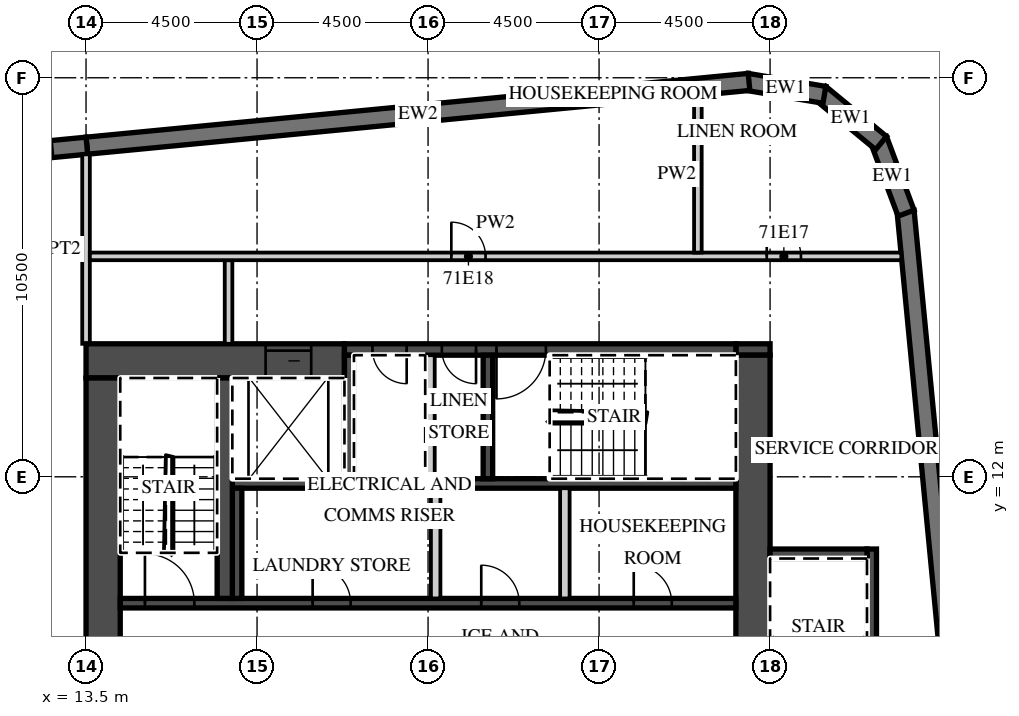
"""IFC4 building model, lengths in metres.
Left out: names, types, materials, properties, quantities, classifications, styles, units other than length and angle.
Written with IfcOpenShell. Run it as: python <this file> out.ifc"""

import sys

from ifc_helpers import new_model, si_unit, direction, frame, frame_2d, origin, place, context, subcontext, project, spatial, polyline, rectangle, outline, extrude, element, fill, save


model = new_model("IFC4")
c1 = context("Model", 3, precision=1e-05, world=origin(), true_north=direction((0.0, 1.0)))
c2 = subcontext(c1, "Body", "Model", "MODEL_VIEW")
j1 = project(units=[si_unit("LENGTHUNIT", "METRE"), si_unit("PLANEANGLEUNIT", "RADIAN")], contexts=[c1])
p1 = place(None, origin())
s1 = spatial("IfcSite", under=j1, at=p1, CompositionType="ELEMENT")
p2 = place(p1, origin())
s2 = spatial("IfcBuilding", under=s1, at=p2, CompositionType="ELEMENT")
p3 = place(p2, frame((0.0, 0.0, 285.0)))
s3 = spatial("IfcBuildingStorey", under=s2, at=p3, CompositionType="ELEMENT", Elevation=285.0)
p4 = place(p3, frame((38.132, -12.858, 0.0), z_axis=(0.0, 0.0, 1.0), x_axis=(-0.095847749461, 0.995396006082, 0.0)))
e1 = element("IfcWall", 1, at=p4, inside=s3, PredefinedType="SOLIDWALL", context=c2, shape_type="SweptSolid", body=[
    extrude(rectangle(XDim=32.0, YDim=0.45, at=frame_2d((16.0, 0.0))), origin(), (0.0, 0.0, 1.0), 3.02),
])
p5 = place(p3, frame((35.078, 18.938, 0.0), z_axis=(0.0, 0.0, 1.0), x_axis=(-0.350192909346, 0.936677599948, 0.0)))
e2 = element("IfcWall", 2, at=p5, inside=s3, PredefinedType="SOLIDWALL", context=c2, shape_type="SweptSolid", body=[
    extrude(outline(polyline([(0.0, -0.225), (2.071, -0.225), (1.95, 0.225), (0.121, 0.225), (0.0, -0.225)])), origin(), (0.0, 0.0, 1.0), 3.02),
])
p6 = place(p3, frame((34.421, 20.782, 0.0), z_axis=(0.0, 0.0, 1.0), x_axis=(-0.771593176315, 0.636116318187, 0.0)))
e3 = element("IfcWall", 3, at=p6, inside=s3, PredefinedType="SOLIDWALL", context=c2, shape_type="SweptSolid", body=[
    extrude(outline(polyline([(0.0, -0.225), (2.071, -0.225), (1.95, 0.225), (0.12, 0.225), (0.0, -0.225)])), origin(), (0.0, 0.0, 1.0), 3.02),
])
p7 = place(p3, frame((32.929, 22.051, 0.0), z_axis=(0.0, 0.0, 1.0), x_axis=(-0.986298144721, 0.164972633245, 0.0)))
e4 = element("IfcWall", 4, at=p7, inside=s3, PredefinedType="SOLIDWALL", context=c2, shape_type="SweptSolid", body=[
    extrude(outline(polyline([(0.0, -0.225), (2.07, -0.225), (1.95, 0.225), (0.121, 0.225), (0.0, -0.225)])), origin(), (0.0, 0.0, 1.0), 3.02),
])
p8 = place(p3, frame((30.946, 22.391, 0.0), z_axis=(0.0, 0.0, 1.0), x_axis=(-0.995396397117, -0.095843688398, 0.0)))
e5 = element("IfcWall", 5, at=p8, inside=s3, PredefinedType="SOLIDWALL", context=c2, shape_type="SweptSolid", body=[
    extrude(rectangle(XDim=17.505, YDim=0.45, at=frame_2d((8.752, 0.0))), origin(), (0.0, 0.0, 1.0), 3.02),
])
p9 = place(p3, frame((13.521, 20.713, 0.0), z_axis=(0.0, 0.0, 1.0), x_axis=(-0.995396277313, -0.095844932638, 0.0)))
e6 = element("IfcWall", 6, at=p9, inside=s3, PredefinedType="SOLIDWALL", context=c2, shape_type="SweptSolid", body=[
    extrude(rectangle(XDim=51.495, YDim=0.45, at=frame_2d((25.748, 0.0))), origin(), (0.0, 0.0, 1.0), 3.02),
])
p10 = place(p9, frame((0.91, 0.0, 0.45)))
e7 = element("IfcOpeningElement", 7, at=p10, cuts=e6, PredefinedType="OPENING", context=c2, shape_type="SweptSolid", body=[
    extrude(rectangle(XDim=2.7, YDim=2.25, at=frame_2d((1.35, 1.125))), frame((0.0, 0.235, 0.0), z_axis=(0.0, -1.0, 0.0), x_axis=(1.0, 0.0, 0.0)), (0.0, 0.0, 1.0), 0.47),
])
p11 = place(p9, frame((5.431, 0.0, 0.45)))
e8 = element("IfcOpeningElement", 8, at=p11, cuts=e6, PredefinedType="OPENING", context=c2, shape_type="SweptSolid", body=[
    extrude(rectangle(XDim=2.7, YDim=2.25, at=frame_2d((1.35, 1.125))), frame((0.0, 0.235, 0.0), z_axis=(0.0, -1.0, 0.0), x_axis=(1.0, 0.0, 0.0)), (0.0, 0.0, 1.0), 0.47),
])
p12 = place(p9, frame((9.952, 0.0, 0.45)))
e9 = element("IfcOpeningElement", 9, at=p12, cuts=e6, PredefinedType="OPENING", context=c2, shape_type="SweptSolid", body=[
    extrude(rectangle(XDim=2.7, YDim=2.25, at=frame_2d((1.35, 1.125))), frame((0.0, 0.235, 0.0), z_axis=(0.0, -1.0, 0.0), x_axis=(1.0, 0.0, 0.0)), (0.0, 0.0, 1.0), 0.47),
])
p13 = place(p9, frame((14.473, 0.0, 0.45)))
e10 = element("IfcOpeningElement", 10, at=p13, cuts=e6, PredefinedType="OPENING", context=c2, shape_type="SweptSolid", body=[
    extrude(rectangle(XDim=2.7, YDim=2.25, at=frame_2d((1.35, 1.125))), frame((0.0, 0.235, 0.0), z_axis=(0.0, -1.0, 0.0), x_axis=(1.0, 0.0, 0.0)), (0.0, 0.0, 1.0), 0.47),
])
p14 = place(p9, frame((18.994, 0.0, 0.45)))
e11 = element("IfcOpeningElement", 11, at=p14, cuts=e6, PredefinedType="OPENING", context=c2, shape_type="SweptSolid", body=[
    extrude(rectangle(XDim=2.7, YDim=2.25, at=frame_2d((1.35, 1.125))), frame((0.0, 0.235, 0.0), z_axis=(0.0, -1.0, 0.0), x_axis=(1.0, 0.0, 0.0)), (0.0, 0.0, 1.0), 0.47),
])
p15 = place(p9, frame((23.514, 0.0, 0.45)))
e12 = element("IfcOpeningElement", 12, at=p15, cuts=e6, PredefinedType="OPENING", context=c2, shape_type="SweptSolid", body=[
    extrude(rectangle(XDim=2.7, YDim=2.25, at=frame_2d((1.35, 1.125))), frame((0.0, 0.235, 0.0), z_axis=(0.0, -1.0, 0.0), x_axis=(1.0, 0.0, 0.0)), (0.0, 0.0, 1.0), 0.47),
])
p16 = place(p9, frame((28.035, 0.0, 0.45)))
e13 = element("IfcOpeningElement", 13, at=p16, cuts=e6, PredefinedType="OPENING", context=c2, shape_type="SweptSolid", body=[
    extrude(rectangle(XDim=2.7, YDim=2.25, at=frame_2d((1.35, 1.125))), frame((0.0, 0.235, 0.0), z_axis=(0.0, -1.0, 0.0), x_axis=(1.0, 0.0, 0.0)), (0.0, 0.0, 1.0), 0.47),
])
p17 = place(p9, frame((32.556, 0.0, 0.45)))
e14 = element("IfcOpeningElement", 14, at=p17, cuts=e6, PredefinedType="OPENING", context=c2, shape_type="SweptSolid", body=[
    extrude(rectangle(XDim=2.7, YDim=2.25, at=frame_2d((1.35, 1.125))), frame((0.0, 0.235, 0.0), z_axis=(0.0, -1.0, 0.0), x_axis=(1.0, 0.0, 0.0)), (0.0, 0.0, 1.0), 0.47),
])
p18 = place(p9, frame((37.077, 0.0, 0.45)))
e15 = element("IfcOpeningElement", 15, at=p18, cuts=e6, PredefinedType="OPENING", context=c2, shape_type="SweptSolid", body=[
    extrude(rectangle(XDim=2.7, YDim=2.25, at=frame_2d((1.35, 1.125))), frame((0.0, 0.235, 0.0), z_axis=(0.0, -1.0, 0.0), x_axis=(1.0, 0.0, 0.0)), (0.0, 0.0, 1.0), 0.47),
])
p19 = place(p9, frame((41.598, 0.0, 0.45)))
e16 = element("IfcOpeningElement", 16, at=p19, cuts=e6, PredefinedType="OPENING", context=c2, shape_type="SweptSolid", body=[
    extrude(rectangle(XDim=2.7, YDim=2.25, at=frame_2d((1.35, 1.125))), frame((0.0, 0.235, 0.0), z_axis=(0.0, -1.0, 0.0), x_axis=(1.0, 0.0, 0.0)), (0.0, 0.0, 1.0), 0.47),
])
p20 = place(p9, frame((46.118, 0.0, 0.45)))
e17 = element("IfcOpeningElement", 17, at=p20, cuts=e6, PredefinedType="OPENING", context=c2, shape_type="SweptSolid", body=[
    extrude(rectangle(XDim=2.7, YDim=2.25, at=frame_2d((1.35, 1.125))), frame((0.0, 0.235, 0.0), z_axis=(0.0, -1.0, 0.0), x_axis=(1.0, 0.0, 0.0)), (0.0, 0.0, 1.0), 0.47),
])
p21 = place(p3, frame((13.5, 15.5, 0.0), z_axis=(0.0, 0.0, 1.0), x_axis=(0.0, 1.0, 0.0)))
e18 = element("IfcWall", 18, at=p21, inside=s3, PredefinedType="PARTITIONING", context=c2, shape_type="SweptSolid", body=[
    extrude(rectangle(XDim=4.985, YDim=0.2, at=frame_2d((2.493, 0.0))), origin(), (0.0, 0.0, 1.0), 3.02),
])
p22 = place(p3, frame((13.5, 15.05, 0.0), z_axis=(0.0, 0.0, 1.0), x_axis=(1.0, 0.0, 0.0)))
e19 = element("IfcWall", 19, at=p22, inside=s3, PredefinedType="SHEAR", context=c2, shape_type="SweptSolid", body=[
    extrude(rectangle(XDim=6.8, YDim=0.9, at=frame_2d((3.4, 0.0))), origin(), (0.0, 0.0, 1.0), 3.02),
])
p23 = place(p22, frame((4.725, 0.0, 0.0)))
e20 = element("IfcOpeningElement", 20, at=p23, cuts=e19, PredefinedType="OPENING", context=c2, shape_type="SweptSolid", body=[
    extrude(rectangle(XDim=1.2, YDim=2.1, at=frame_2d((0.6, 1.05))), frame((0.0, 0.46, 0.0), z_axis=(0.0, -1.0, 0.0), x_axis=(1.0, 0.0, 0.0)), (0.0, 0.0, 1.0), 0.92),
])
p24 = place(p3, frame((30.6, 15.35, 0.0), z_axis=(0.0, 0.0, 1.0), x_axis=(1.0, 0.0, 0.0)))
e21 = element("IfcWall", 21, at=p24, inside=s3, PredefinedType="SHEAR", context=c2, shape_type="SweptSolid", body=[
    extrude(rectangle(XDim=0.9, YDim=0.3, at=frame_2d((0.45, 0.0))), origin(), (0.0, 0.0, 1.0), 3.02),
])
p25 = place(p3, frame((20.3, 15.35, 0.0), z_axis=(0.0, 0.0, 1.0), x_axis=(1.0, 0.0, 0.0)))
e22 = element("IfcWall", 22, at=p25, inside=s3, PredefinedType="SHEAR", context=c2, shape_type="SweptSolid", body=[
    extrude(rectangle(XDim=10.3, YDim=0.3, at=frame_2d((5.15, 0.0))), origin(), (0.0, 0.0, 1.0), 3.02),
])
p26 = place(p25, frame((4.0, 0.0, 0.0)))
e23 = element("IfcOpeningElement", 23, at=p26, cuts=e22, PredefinedType="OPENING", context=c2, shape_type="SweptSolid", body=[
    extrude(rectangle(XDim=1.3, YDim=2.1, at=frame_2d((0.65, 1.05))), frame((0.0, 0.16, 0.0), z_axis=(0.0, -1.0, 0.0), x_axis=(1.0, 0.0, 0.0)), (0.0, 0.0, 1.0), 0.32),
])
p27 = place(p25, frame((2.562, 0.0, 0.0)))
e24 = element("IfcOpeningElement", 24, at=p27, cuts=e22, PredefinedType="OPENING", context=c2, shape_type="SweptSolid", body=[
    extrude(rectangle(XDim=0.9, YDim=2.1, at=frame_2d((0.45, 1.05))), frame((0.0, 0.16, 0.0), z_axis=(0.0, -1.0, 0.0), x_axis=(1.0, 0.0, 0.0)), (0.0, 0.0, 1.0), 0.32),
])
p28 = place(p25, frame((0.738, 0.0, 0.0)))
e25 = element("IfcOpeningElement", 25, at=p28, cuts=e22, PredefinedType="OPENING", context=c2, shape_type="SweptSolid", body=[
    extrude(rectangle(XDim=0.9, YDim=2.1, at=frame_2d((0.45, 1.05))), frame((0.0, 0.16, 0.0), z_axis=(0.0, -1.0, 0.0), x_axis=(1.0, 0.0, 0.0)), (0.0, 0.0, 1.0), 0.32),
])
p29 = place(p3, frame((31.05, 2.4, 0.0), z_axis=(0.0, 0.0, 1.0), x_axis=(0.0, 1.0, 0.0)))
e26 = element("IfcWall", 26, at=p29, inside=s3, PredefinedType="SHEAR", context=c2, shape_type="SweptSolid", body=[
    extrude(rectangle(XDim=12.8, YDim=0.9, at=frame_2d((6.4, 0.0))), origin(), (0.0, 0.0, 1.0), 3.02),
])
p30 = place(p29, frame((0.2, 0.0, 0.0)))
e27 = element("IfcOpeningElement", 27, at=p30, cuts=e26, PredefinedType="OPENING", context=c2, shape_type="SweptSolid", body=[
    extrude(rectangle(XDim=1.1, YDim=2.1, at=frame_2d((0.55, 1.05))), frame((0.0, 0.46, 0.0), z_axis=(0.0, -1.0, 0.0), x_axis=(1.0, 0.0, 0.0)), (0.0, 0.0, 1.0), 0.92),
])
p31 = place(p3, frame((13.95, 2.4, 0.0), z_axis=(0.0, 0.0, 1.0), x_axis=(0.0, 1.0, 0.0)))
e28 = element("IfcWall", 28, at=p31, inside=s3, PredefinedType="SHEAR", context=c2, shape_type="SweptSolid", body=[
    extrude(rectangle(XDim=12.2, YDim=0.9, at=frame_2d((6.1, 0.0))), origin(), (0.0, 0.0, 1.0), 3.02),
])
p32 = place(p3, frame((14.4, 8.675, 0.0), z_axis=(0.0, 0.0, 1.0), x_axis=(1.0, 0.0, 0.0)))
e29 = element("IfcWall", 29, at=p32, inside=s3, PredefinedType="SHEAR", context=c2, shape_type="SweptSolid", body=[
    extrude(rectangle(XDim=16.2, YDim=0.25, at=frame_2d((8.1, 0.0))), origin(), (0.0, 0.0, 1.0), 3.02),
])
p33 = place(p32, frame((0.65, 0.0, 0.0)))
e30 = element("IfcOpeningElement", 30, at=p33, cuts=e29, PredefinedType="OPENING", context=c2, shape_type="SweptSolid", body=[
    extrude(rectangle(XDim=1.3, YDim=2.1, at=frame_2d((0.65, 1.05))), frame((0.0, 0.135, 0.0), z_axis=(0.0, -1.0, 0.0), x_axis=(1.0, 0.0, 0.0)), (0.0, 0.0, 1.0), 0.27),
])
p34 = place(p32, frame((13.512, 0.0, 0.0)))
e31 = element("IfcOpeningElement", 31, at=p34, cuts=e29, PredefinedType="OPENING", context=c2, shape_type="SweptSolid", body=[
    extrude(rectangle(XDim=1.0, YDim=2.1, at=frame_2d((0.5, 1.05))), frame((0.0, 0.135, 0.0), z_axis=(0.0, -1.0, 0.0), x_axis=(1.0, 0.0, 0.0)), (0.0, 0.0, 1.0), 0.27),
])
p35 = place(p32, frame((9.5, 0.0, 0.0)))
e32 = element("IfcOpeningElement", 32, at=p35, cuts=e29, PredefinedType="OPENING", context=c2, shape_type="SweptSolid", body=[
    extrude(rectangle(XDim=1.0, YDim=2.1, at=frame_2d((0.5, 1.05))), frame((0.0, 0.135, 0.0), z_axis=(0.0, -1.0, 0.0), x_axis=(1.0, 0.0, 0.0)), (0.0, 0.0, 1.0), 0.27),
])
p36 = place(p32, frame((5.062, 0.0, 0.0)))
e33 = element("IfcOpeningElement", 33, at=p36, cuts=e29, PredefinedType="OPENING", context=c2, shape_type="SweptSolid", body=[
    extrude(rectangle(XDim=1.0, YDim=2.1, at=frame_2d((0.5, 1.05))), frame((0.0, 0.135, 0.0), z_axis=(0.0, -1.0, 0.0), x_axis=(1.0, 0.0, 0.0)), (0.0, 0.0, 1.0), 0.27),
])
p37 = place(p3, frame((17.35, 11.825, 0.0), z_axis=(0.0, 0.0, 1.0), x_axis=(1.0, 0.0, 0.0)))
e34 = element("IfcWall", 34, at=p37, inside=s3, PredefinedType="SHEAR", context=c2, shape_type="SweptSolid", body=[
    extrude(rectangle(XDim=13.25, YDim=0.25, at=frame_2d((6.625, 0.0))), origin(), (0.0, 0.0, 1.0), 3.02),
])
p38 = place(p3, frame((17.475, 8.8, 0.0), z_axis=(0.0, 0.0, 1.0), x_axis=(0.0, 1.0, 0.0)))
e35 = element("IfcWall", 35, at=p38, inside=s3, PredefinedType="SHEAR", context=c2, shape_type="SweptSolid", body=[
    extrude(rectangle(XDim=2.9, YDim=0.25, at=frame_2d((1.45, 0.0))), origin(), (0.0, 0.0, 1.0), 3.02),
])
for number, where, z_axis, x_axis in (
    (36, (26.1, 8.8, 0.0), (0.0, 0.0, 1.0), (0.0, 1.0, 0.0)),
    (37, (22.7, 8.8, 0.0), (0.0, 0.0, 1.0), (0.0, 1.0, 0.0)),
):
    element("IfcWall", number, at=place(p3, frame(where, z_axis=z_axis, x_axis=x_axis)), inside=s3, PredefinedType="PARTITIONING", context=c2, shape_type="SweptSolid", body=[
        extrude(rectangle(XDim=2.9, YDim=0.25, at=frame_2d((1.45, 0.0))), origin(), (0.0, 0.0, 1.0), 3.02),
    ])
p39 = place(p3, frame((17.15, 8.8, 0.0), z_axis=(0.0, 0.0, 1.0), x_axis=(0.0, 1.0, 0.0)))
e38 = element("IfcWall", 38, at=p39, inside=s3, PredefinedType="SHEAR", context=c2, shape_type="SweptSolid", body=[
    extrude(rectangle(XDim=5.8, YDim=0.4, at=frame_2d((2.9, 0.0))), origin(), (0.0, 0.0, 1.0), 3.02),
])
for number, where, z_axis, x_axis in (
    (39, (20.425, 11.95, 0.0), (0.0, 0.0, 1.0), (0.0, 1.0, 0.0)),
    (40, (24.075, 11.95, 0.0), (0.0, 0.0, 1.0), (0.0, 1.0, 0.0)),
):
    element("IfcWall", number, at=place(p3, frame(where, z_axis=z_axis, x_axis=x_axis)), inside=s3, PredefinedType="SHEAR", context=c2, shape_type="SweptSolid", body=[
        extrude(rectangle(XDim=3.25, YDim=0.25, at=frame_2d((1.625, 0.0))), origin(), (0.0, 0.0, 1.0), 3.02),
    ])
p40 = place(p3, frame((22.55, 11.95, 0.0), z_axis=(0.0, 0.0, 1.0), x_axis=(0.0, 1.0, 0.0)))
e41 = element("IfcWall", 41, at=p40, inside=s3, PredefinedType="PARTITIONING", context=c2, shape_type="SweptSolid", body=[
    extrude(rectangle(XDim=3.25, YDim=0.25, at=frame_2d((1.625, 0.0))), origin(), (0.0, 0.0, 1.0), 3.02),
])
p41 = place(p3, frame((34.175, 1.75, 0.0), z_axis=(0.0, 0.0, 1.0), x_axis=(0.0, 1.0, 0.0)))
e42 = element("IfcWall", 42, at=p41, inside=s3, PredefinedType="SHEAR", context=c2, shape_type="SweptSolid", body=[
    extrude(rectangle(XDim=8.35, YDim=0.25, at=frame_2d((4.175, 0.0))), origin(), (0.0, 0.0, 1.0), 3.02),
])
p42 = place(p3, frame((31.5, 9.975, 0.0), z_axis=(0.0, 0.0, 1.0), x_axis=(1.0, 0.0, 0.0)))
e43 = element("IfcWall", 43, at=p42, inside=s3, PredefinedType="SHEAR", context=c2, shape_type="SweptSolid", body=[
    extrude(rectangle(XDim=2.55, YDim=0.25, at=frame_2d((1.275, 0.0))), origin(), (0.0, 0.0, 1.0), 3.02),
])
p43 = place(p3, frame((17.25, 15.5, 0.0), z_axis=(0.0, 0.0, 1.0), x_axis=(0.0, 1.0, 0.0)))
e44 = element("IfcWall", 44, at=p43, inside=s3, PredefinedType="PARTITIONING", context=c2, shape_type="SweptSolid", body=[
    extrude(rectangle(XDim=2.2, YDim=0.2, at=frame_2d((1.1, 0.0))), origin(), (0.0, 0.0, 1.0), 3.02),
])
p44 = place(p3, frame((13.6, 17.8, 0.0), z_axis=(0.0, 0.0, 1.0), x_axis=(1.0, 0.0, 0.0)))
e45 = element("IfcWall", 45, at=p44, inside=s3, PredefinedType="PARTITIONING", context=c2, shape_type="SweptSolid", body=[
    extrude(rectangle(XDim=21.354, YDim=0.2, at=frame_2d((10.677, 0.0))), origin(), (0.0, 0.0, 1.0), 3.02),
])
p45 = place(p44, frame((17.812, 0.0, 0.0)))
e46 = element("IfcOpeningElement", 46, at=p45, cuts=e45, PredefinedType="OPENING", context=c2, shape_type="SweptSolid", body=[
    extrude(rectangle(XDim=0.9, YDim=2.1, at=frame_2d((0.45, 1.05))), frame((0.0, 0.11, 0.0), z_axis=(0.0, -1.0, 0.0), x_axis=(1.0, 0.0, 0.0)), (0.0, 0.0, 1.0), 0.22),
])
p46 = place(p44, frame((9.512, 0.0, 0.0)))
e47 = element("IfcOpeningElement", 47, at=p46, cuts=e45, PredefinedType="OPENING", context=c2, shape_type="SweptSolid", body=[
    extrude(rectangle(XDim=0.9, YDim=2.1, at=frame_2d((0.45, 1.05))), frame((0.0, 0.11, 0.0), z_axis=(0.0, -1.0, 0.0), x_axis=(1.0, 0.0, 0.0)), (0.0, 0.0, 1.0), 0.22),
])
p47 = place(p3, frame((29.6, 17.9, 0.0), z_axis=(0.0, 0.0, 1.0), x_axis=(0.0, 1.0, 0.0)))
e48 = element("IfcWall", 48, at=p47, inside=s3, PredefinedType="PARTITIONING", context=c2, shape_type="SweptSolid", body=[
    extrude(rectangle(XDim=4.136, YDim=0.2, at=frame_2d((2.068, 0.0))), origin(), (0.0, 0.0, 1.0), 3.02),
])
p48 = place(p10, origin())
e49 = element("IfcWindow", 49, at=p48, inside=s3, PartitioningType="SINGLE_PANEL", PredefinedType="WINDOW", context=c2, shape_type="SweptSolid", body=[
    extrude(rectangle(XDim=2.7, YDim=2.25, at=frame_2d((1.35, 1.125))), frame((0.0, 0.09, 0.0), z_axis=(0.0, -1.0, 0.0), x_axis=(1.0, 0.0, 0.0)), (0.0, 0.0, 1.0), 0.06),
])
fill(e7, e49)
p49 = place(p23, origin())
e50 = element("IfcDoor", 50, at=p49, inside=s3, OperationType="SLIDING_TO_LEFT", PredefinedType="DOOR", context=c2, shape_type="SweptSolid", body=[
    extrude(rectangle(XDim=1.2, YDim=2.1, at=frame_2d((0.6, 1.05))), frame((0.0, 0.025, 0.0), z_axis=(0.0, -1.0, 0.0), x_axis=(1.0, 0.0, 0.0)), (0.0, 0.0, 1.0), 0.05),
])
fill(e20, e50)
p50 = place(p33, origin())
e51 = element("IfcDoor", 51, at=p50, inside=s3, OperationType="SINGLE_SWING_LEFT", PredefinedType="DOOR", context=c2, shape_type="SweptSolid", body=[
    extrude(rectangle(XDim=1.3, YDim=2.1, at=frame_2d((0.65, 1.05))), frame((0.0, 0.025, 0.0), z_axis=(0.0, -1.0, 0.0), x_axis=(1.0, 0.0, 0.0)), (0.0, 0.0, 1.0), 0.05),
])
fill(e30, e51)
p51 = place(p26, origin())
e52 = element("IfcDoor", 52, at=p51, inside=s3, OperationType="SINGLE_SWING_LEFT", PredefinedType="DOOR", context=c2, shape_type="SweptSolid", body=[
    extrude(rectangle(XDim=1.3, YDim=2.1, at=frame_2d((0.65, 1.05))), frame((0.0, 0.025, 0.0), z_axis=(0.0, -1.0, 0.0), x_axis=(1.0, 0.0, 0.0)), (0.0, 0.0, 1.0), 0.05),
])
fill(e23, e52)
p52 = place(p27, origin())
e53 = element("IfcDoor", 53, at=p52, inside=s3, OperationType="SINGLE_SWING_RIGHT", PredefinedType="DOOR", context=c2, shape_type="SweptSolid", body=[
    extrude(rectangle(XDim=0.9, YDim=2.1, at=frame_2d((0.45, 1.05))), frame((0.0, 0.025, 0.0), z_axis=(0.0, -1.0, 0.0), x_axis=(1.0, 0.0, 0.0)), (0.0, 0.0, 1.0), 0.05),
])
fill(e24, e53)
p53 = place(p28, origin())
e54 = element("IfcDoor", 54, at=p53, inside=s3, OperationType="SINGLE_SWING_RIGHT", PredefinedType="DOOR", context=c2, shape_type="SweptSolid", body=[
    extrude(rectangle(XDim=0.9, YDim=2.1, at=frame_2d((0.45, 1.05))), frame((0.0, 0.025, 0.0), z_axis=(0.0, -1.0, 0.0), x_axis=(1.0, 0.0, 0.0)), (0.0, 0.0, 1.0), 0.05),
])
fill(e25, e54)
p54 = place(p34, origin())
e55 = element("IfcDoor", 55, at=p54, inside=s3, OperationType="SINGLE_SWING_LEFT", PredefinedType="DOOR", context=c2, shape_type="SweptSolid", body=[
    extrude(rectangle(XDim=1.0, YDim=2.1, at=frame_2d((0.5, 1.05))), frame((0.0, 0.025, 0.0), z_axis=(0.0, -1.0, 0.0), x_axis=(1.0, 0.0, 0.0)), (0.0, 0.0, 1.0), 0.05),
])
fill(e31, e55)
p55 = place(p35, origin())
e56 = element("IfcDoor", 56, at=p55, inside=s3, OperationType="SINGLE_SWING_LEFT", PredefinedType="DOOR", context=c2, shape_type="SweptSolid", body=[
    extrude(rectangle(XDim=1.0, YDim=2.1, at=frame_2d((0.5, 1.05))), frame((0.0, 0.025, 0.0), z_axis=(0.0, -1.0, 0.0), x_axis=(1.0, 0.0, 0.0)), (0.0, 0.0, 1.0), 0.05),
])
fill(e32, e56)
p56 = place(p36, origin())
e57 = element("IfcDoor", 57, at=p56, inside=s3, OperationType="SINGLE_SWING_LEFT", PredefinedType="DOOR", context=c2, shape_type="SweptSolid", body=[
    extrude(rectangle(XDim=1.0, YDim=2.1, at=frame_2d((0.5, 1.05))), frame((0.0, 0.025, 0.0), z_axis=(0.0, -1.0, 0.0), x_axis=(1.0, 0.0, 0.0)), (0.0, 0.0, 1.0), 0.05),
])
fill(e33, e57)
p57 = place(p45, origin())
e58 = element("IfcDoor", 58, at=p57, inside=s3, OperationType="SINGLE_SWING_LEFT", PredefinedType="DOOR", context=c2, shape_type="SweptSolid", body=[
    extrude(rectangle(XDim=0.9, YDim=2.1, at=frame_2d((0.45, 1.05))), frame((0.0, 0.025, 0.0), z_axis=(0.0, -1.0, 0.0), x_axis=(1.0, 0.0, 0.0)), (0.0, 0.0, 1.0), 0.05),
])
fill(e46, e58)
p58 = place(p46, origin())
e59 = element("IfcDoor", 59, at=p58, inside=s3, OperationType="SINGLE_SWING_LEFT", PredefinedType="DOOR", context=c2, shape_type="SweptSolid", body=[
    extrude(rectangle(XDim=0.9, YDim=2.1, at=frame_2d((0.45, 1.05))), frame((0.0, 0.025, 0.0), z_axis=(0.0, -1.0, 0.0), x_axis=(1.0, 0.0, 0.0)), (0.0, 0.0, 1.0), 0.05),
])
fill(e47, e59)
save(model, sys.argv[1])
